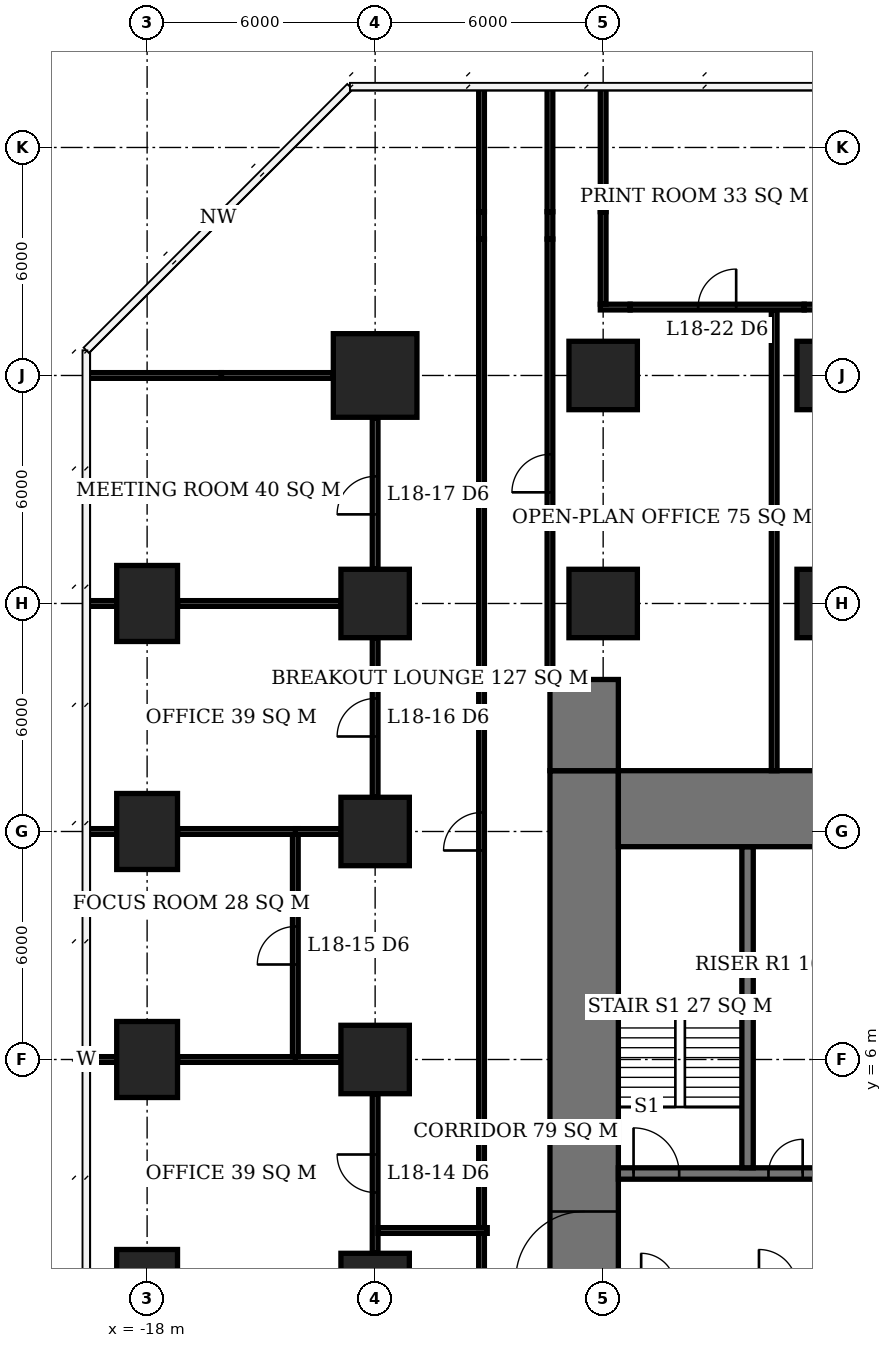
"""IFC4 building model, lengths in metres.
Left out: names, types, materials, properties, quantities, classifications, styles, units other than length and angle.
Written with IfcOpenShell. Run it as: python <this file> out.ifc"""

import sys

from ifc_helpers import new_model, si_unit, direction, frame, frame_2d, origin, origin_2d, place, context, subcontext, project, spatial, rectangle, extrude, element, fill, save


model = new_model("IFC4")
c1 = context("Model", 3, precision=1e-05, world=origin(), true_north=direction((0.0, 1.0)))
c2 = subcontext(c1, "Body", "Model", "MODEL_VIEW")
j1 = project(units=[si_unit("LENGTHUNIT", "METRE"), si_unit("PLANEANGLEUNIT", "RADIAN")], contexts=[c1])
p1 = place(None, origin())
s1 = spatial("IfcSite", under=j1, at=p1, CompositionType="ELEMENT")
p2 = place(p1, origin())
s2 = spatial("IfcBuilding", under=s1, at=p2, CompositionType="ELEMENT")
p3 = place(p2, frame((0.0, 0.0, 76.7)))
s3 = spatial("IfcBuildingStorey", under=s2, at=p3, CompositionType="ELEMENT", Elevation=76.7)
for number, where, z_axis, x_axis in (
    (1, (-18.0, 0.0, 0.0), (0.0, 0.0, 1.0), (0.0, 1.0, 0.0)),
    (2, (-18.0, 6.0, 0.0), (0.0, 0.0, 1.0), (0.0, 1.0, 0.0)),
    (3, (-18.0, 12.0, 0.0), (0.0, 0.0, 1.0), (0.0, 1.0, 0.0)),
    (4, (-18.0, 18.0, 0.0), (0.0, 0.0, 1.0), (0.0, 1.0, 0.0)),
):
    element("IfcColumn", number, at=place(p3, frame(where, z_axis=z_axis, x_axis=x_axis)), inside=s3, PredefinedType="COLUMN", context=c2, shape_type="SweptSolid", body=[
        extrude(rectangle(XDim=2.0, YDim=1.6, at=origin_2d()), origin(), (0.0, 0.0, 1.0), 3.9),
    ])
for number, where, z_axis, x_axis in (
    (5, (-12.0, 0.0, 0.0), (0.0, 0.0, 1.0), (1.0, 0.0, 0.0)),
    (6, (-12.0, 6.0, 0.0), (0.0, 0.0, 1.0), (1.0, 0.0, 0.0)),
    (7, (-12.0, 12.0, 0.0), (0.0, 0.0, 1.0), (1.0, 0.0, 0.0)),
    (8, (-12.0, 18.0, 0.0), (0.0, 0.0, 1.0), (1.0, 0.0, 0.0)),
):
    element("IfcColumn", number, at=place(p3, frame(where, z_axis=z_axis, x_axis=x_axis)), inside=s3, PredefinedType="COLUMN", context=c2, shape_type="SweptSolid", body=[
        extrude(rectangle(XDim=1.8, YDim=1.8, at=origin_2d()), origin(), (0.0, 0.0, 1.0), 3.9),
    ])
p4 = place(p3, frame((-12.0, 24.0, 0.0), z_axis=(0.0, 0.0, 1.0), x_axis=(1.0, 0.0, 0.0)))
e9 = element("IfcColumn", 9, at=p4, inside=s3, PredefinedType="COLUMN", context=c2, shape_type="SweptSolid", body=[
    extrude(rectangle(XDim=2.2, YDim=2.2, at=origin_2d()), origin(), (0.0, 0.0, 1.0), 3.9),
])
for number, where, z_axis, x_axis in (
    (10, (-6.0, 18.0, 0.0), (0.0, 0.0, 1.0), (1.0, 0.0, 0.0)),
    (11, (-6.0, 24.0, 0.0), (0.0, 0.0, 1.0), (1.0, 0.0, 0.0)),
    (12, (0.0, 18.0, 0.0), (0.0, 0.0, 1.0), (1.0, 0.0, 0.0)),
    (13, (0.0, 24.0, 0.0), (0.0, 0.0, 1.0), (1.0, 0.0, 0.0)),
):
    element("IfcColumn", number, at=place(p3, frame(where, z_axis=z_axis, x_axis=x_axis)), inside=s3, PredefinedType="COLUMN", context=c2, shape_type="SweptSolid", body=[
        extrude(rectangle(XDim=1.8, YDim=1.8, at=origin_2d()), origin(), (0.0, 0.0, 1.0), 3.9),
    ])
p5 = place(p3, frame((-5.6, 12.6, 0.0), z_axis=(0.0, 0.0, 1.0), x_axis=(1.0, 0.0, 0.0)))
e14 = element("IfcWall", 14, at=p5, inside=s3, PredefinedType="SHEAR", context=c2, shape_type="SweptSolid", body=[
    extrude(rectangle(XDim=23.2, YDim=2.0, at=frame_2d((11.6, 0.0))), origin(), (0.0, 0.0, 1.0), 3.9),
])
p6 = place(p3, frame((-6.5, -7.6, 0.0), z_axis=(0.0, 0.0, 1.0), x_axis=(0.0, 1.0, 0.0)))
e15 = element("IfcWall", 15, at=p6, inside=s3, PredefinedType="SHEAR", context=c2, shape_type="SweptSolid", body=[
    extrude(rectangle(XDim=21.2, YDim=1.8, at=frame_2d((10.6, 0.0))), origin(), (0.0, 0.0, 1.0), 3.9),
])
p7 = place(p6, frame((7.8, 0.0, 0.0)))
e16 = element("IfcOpeningElement", 16, at=p7, cuts=e15, PredefinedType="OPENING", context=c2, shape_type="SweptSolid", body=[
    extrude(rectangle(XDim=1.8, YDim=2.4, at=frame_2d((0.9, 1.2))), frame((0.0, 0.91, 0.0), z_axis=(0.0, -1.0, 0.0), x_axis=(1.0, 0.0, 0.0)), (0.0, 0.0, 1.0), 1.82),
])
p8 = place(p3, frame((-6.5, 13.6, 0.0), z_axis=(0.0, 0.0, 1.0), x_axis=(0.0, 1.0, 0.0)))
e17 = element("IfcWall", 17, at=p8, inside=s3, PredefinedType="SHEAR", context=c2, shape_type="SweptSolid", body=[
    extrude(rectangle(XDim=2.4, YDim=1.8, at=frame_2d((1.2, 0.0))), origin(), (0.0, 0.0, 1.0), 3.9),
])
p9 = place(p3, frame((-5.6, 3.0, 0.0), z_axis=(0.0, 0.0, 1.0), x_axis=(1.0, 0.0, 0.0)))
e18 = element("IfcWall", 18, at=p9, inside=s3, PredefinedType="SHEAR", context=c2, shape_type="SweptSolid", body=[
    extrude(rectangle(XDim=5.45, YDim=0.3, at=frame_2d((2.725, 0.0))), origin(), (0.0, 0.0, 1.0), 3.9),
])
p10 = place(p9, frame((0.4, 0.0, 0.0)))
e19 = element("IfcOpeningElement", 19, at=p10, cuts=e18, PredefinedType="OPENING", context=c2, shape_type="SweptSolid", body=[
    extrude(rectangle(XDim=1.2, YDim=2.1, at=frame_2d((0.6, 1.05))), frame((0.0, 0.16, 0.0), z_axis=(0.0, -1.0, 0.0), x_axis=(1.0, 0.0, 0.0)), (0.0, 0.0, 1.0), 0.32),
])
p11 = place(p9, frame((3.95, 0.0, 0.0)))
e20 = element("IfcOpeningElement", 20, at=p11, cuts=e18, PredefinedType="OPENING", context=c2, shape_type="SweptSolid", body=[
    extrude(rectangle(XDim=0.9, YDim=2.1, at=frame_2d((0.45, 1.05))), frame((0.0, 0.16, 0.0), z_axis=(0.0, -1.0, 0.0), x_axis=(1.0, 0.0, 0.0)), (0.0, 0.0, 1.0), 0.32),
])
p12 = place(p3, frame((-2.2, 3.15, 0.0), z_axis=(0.0, 0.0, 1.0), x_axis=(0.0, 1.0, 0.0)))
e21 = element("IfcWall", 21, at=p12, inside=s3, PredefinedType="SHEAR", context=c2, shape_type="SweptSolid", body=[
    extrude(rectangle(XDim=8.45, YDim=0.3, at=frame_2d((4.225, 0.0))), origin(), (0.0, 0.0, 1.0), 3.9),
])
p13 = place(p3, frame((-19.55, 6.0, 0.0), z_axis=(0.0, 0.0, 1.0), x_axis=(1.0, 0.0, 0.0)))
e22 = element("IfcWall", 22, at=p13, inside=s3, PredefinedType="PARTITIONING", context=c2, shape_type="SweptSolid", body=[
    extrude(rectangle(XDim=0.75, YDim=0.15, at=frame_2d((0.375, 0.0))), origin(), (0.0, 0.0, 1.0), 3.65),
])
p14 = place(p3, frame((-17.2, 6.0, 0.0), z_axis=(0.0, 0.0, 1.0), x_axis=(1.0, 0.0, 0.0)))
e23 = element("IfcWall", 23, at=p14, inside=s3, PredefinedType="PARTITIONING", context=c2, shape_type="SweptSolid", body=[
    extrude(rectangle(XDim=3.175, YDim=0.15, at=frame_2d((1.587, 0.0))), origin(), (0.0, 0.0, 1.0), 3.65),
])
p15 = place(p3, frame((-14.1, 6.0, 0.0), z_axis=(0.0, 0.0, 1.0), x_axis=(1.0, 0.0, 0.0)))
e24 = element("IfcWall", 24, at=p15, inside=s3, PredefinedType="PARTITIONING", context=c2, shape_type="SweptSolid", body=[
    extrude(rectangle(XDim=1.2, YDim=0.15, at=frame_2d((0.6, 0.0))), origin(), (0.0, 0.0, 1.0), 3.65),
])
p16 = place(p3, frame((-19.6, 12.0, 0.0), z_axis=(0.0, 0.0, 1.0), x_axis=(1.0, 0.0, 0.0)))
e25 = element("IfcWall", 25, at=p16, inside=s3, PredefinedType="PARTITIONING", context=c2, shape_type="SweptSolid", body=[
    extrude(rectangle(XDim=0.8, YDim=0.15, at=frame_2d((0.4, 0.0))), origin(), (0.0, 0.0, 1.0), 3.65),
])
p17 = place(p3, frame((-17.2, 12.0, 0.0), z_axis=(0.0, 0.0, 1.0), x_axis=(1.0, 0.0, 0.0)))
e26 = element("IfcWall", 26, at=p17, inside=s3, PredefinedType="PARTITIONING", context=c2, shape_type="SweptSolid", body=[
    extrude(rectangle(XDim=3.175, YDim=0.15, at=frame_2d((1.587, 0.0))), origin(), (0.0, 0.0, 1.0), 3.65),
])
p18 = place(p3, frame((-14.1, 12.0, 0.0), z_axis=(0.0, 0.0, 1.0), x_axis=(1.0, 0.0, 0.0)))
e27 = element("IfcWall", 27, at=p18, inside=s3, PredefinedType="PARTITIONING", context=c2, shape_type="SweptSolid", body=[
    extrude(rectangle(XDim=1.2, YDim=0.15, at=frame_2d((0.6, 0.0))), origin(), (0.0, 0.0, 1.0), 3.65),
])
p19 = place(p3, frame((-19.6, 18.0, 0.0), z_axis=(0.0, 0.0, 1.0), x_axis=(1.0, 0.0, 0.0)))
e28 = element("IfcWall", 28, at=p19, inside=s3, PredefinedType="PARTITIONING", context=c2, shape_type="SweptSolid", body=[
    extrude(rectangle(XDim=0.8, YDim=0.15, at=frame_2d((0.4, 0.0))), origin(), (0.0, 0.0, 1.0), 3.65),
])
p20 = place(p3, frame((-17.2, 18.0, 0.0), z_axis=(0.0, 0.0, 1.0), x_axis=(1.0, 0.0, 0.0)))
e29 = element("IfcWall", 29, at=p20, inside=s3, PredefinedType="PARTITIONING", context=c2, shape_type="SweptSolid", body=[
    extrude(rectangle(XDim=4.3, YDim=0.15, at=frame_2d((2.15, 0.0))), origin(), (0.0, 0.0, 1.0), 3.65),
])
p21 = place(p3, frame((-19.6, 24.0, 0.0), z_axis=(0.0, 0.0, 1.0), x_axis=(1.0, 0.0, 0.0)))
e30 = element("IfcWall", 30, at=p21, inside=s3, PredefinedType="PARTITIONING", context=c2, shape_type="SweptSolid", body=[
    extrude(rectangle(XDim=3.555, YDim=0.15, at=frame_2d((1.778, 0.0))), origin(), (0.0, 0.0, 1.0), 3.65),
])
p22 = place(p3, frame((-16.045, 24.0, 0.0), z_axis=(0.0, 0.0, 1.0), x_axis=(1.0, 0.0, 0.0)))
e31 = element("IfcWall", 31, at=p22, inside=s3, PredefinedType="PARTITIONING", context=c2, shape_type="SweptSolid", body=[
    extrude(rectangle(XDim=2.945, YDim=0.15, at=frame_2d((1.472, 0.0))), origin(), (0.0, 0.0, 1.0), 2.65),
])
p23 = place(p3, frame((-6.075, 25.8, 0.0), z_axis=(0.0, 0.0, 1.0), x_axis=(1.0, 0.0, 0.0)))
e32 = element("IfcWall", 32, at=p23, inside=s3, PredefinedType="PARTITIONING", context=c2, shape_type="SweptSolid", body=[
    extrude(rectangle(XDim=0.785, YDim=0.15, at=frame_2d((0.393, 0.0))), origin(), (0.0, 0.0, 1.0), 2.65),
])
p24 = place(p3, frame((-5.29, 25.8, 0.0), z_axis=(0.0, 0.0, 1.0), x_axis=(1.0, 0.0, 0.0)))
e33 = element("IfcWall", 33, at=p24, inside=s3, PredefinedType="PARTITIONING", context=c2, shape_type="SweptSolid", body=[
    extrude(rectangle(XDim=4.58, YDim=0.15, at=frame_2d((2.29, 0.0))), origin(), (0.0, 0.0, 1.0), 3.65),
])
p25 = place(p24, frame((1.79, 0.0, 0.0)))
e34 = element("IfcOpeningElement", 34, at=p25, cuts=e33, PredefinedType="OPENING", context=c2, shape_type="SweptSolid", body=[
    extrude(rectangle(XDim=1.0, YDim=2.1, at=frame_2d((0.5, 1.05))), frame((0.0, 0.085, 0.0), z_axis=(0.0, -1.0, 0.0), x_axis=(1.0, 0.0, 0.0)), (0.0, 0.0, 1.0), 0.17),
])
p26 = place(p3, frame((-0.71, 25.8, 0.0), z_axis=(0.0, 0.0, 1.0), x_axis=(1.0, 0.0, 0.0)))
e35 = element("IfcWall", 35, at=p26, inside=s3, PredefinedType="PARTITIONING", context=c2, shape_type="SweptSolid", body=[
    extrude(rectangle(XDim=0.785, YDim=0.15, at=frame_2d((0.393, 0.0))), origin(), (0.0, 0.0, 1.0), 2.65),
])
p27 = place(p3, frame((-14.1, 6.075, 0.0), z_axis=(0.0, 0.0, 1.0), x_axis=(0.0, 1.0, 0.0)))
e36 = element("IfcWall", 36, at=p27, inside=s3, PredefinedType="PARTITIONING", context=c2, shape_type="SweptSolid", body=[
    extrude(rectangle(XDim=5.85, YDim=0.15, at=frame_2d((2.925, 0.0))), origin(), (0.0, 0.0, 1.0), 3.65),
])
p28 = place(p27, frame((2.425, 0.0, 0.0)))
e37 = element("IfcOpeningElement", 37, at=p28, cuts=e36, PredefinedType="OPENING", context=c2, shape_type="SweptSolid", body=[
    extrude(rectangle(XDim=1.0, YDim=2.1, at=frame_2d((0.5, 1.05))), frame((0.0, 0.085, 0.0), z_axis=(0.0, -1.0, 0.0), x_axis=(1.0, 0.0, 0.0)), (0.0, 0.0, 1.0), 0.17),
])
p29 = place(p3, frame((-12.0, 0.9, 0.0), z_axis=(0.0, 0.0, 1.0), x_axis=(0.0, 1.0, 0.0)))
e38 = element("IfcWall", 38, at=p29, inside=s3, PredefinedType="PARTITIONING", context=c2, shape_type="SweptSolid", body=[
    extrude(rectangle(XDim=4.2, YDim=0.15, at=frame_2d((2.1, 0.0))), origin(), (0.0, 0.0, 1.0), 3.65),
])
p30 = place(p29, frame((1.6, 0.0, 0.0)))
e39 = element("IfcOpeningElement", 39, at=p30, cuts=e38, PredefinedType="OPENING", context=c2, shape_type="SweptSolid", body=[
    extrude(rectangle(XDim=1.0, YDim=2.1, at=frame_2d((0.5, 1.05))), frame((0.0, 0.085, 0.0), z_axis=(0.0, -1.0, 0.0), x_axis=(1.0, 0.0, 0.0)), (0.0, 0.0, 1.0), 0.17),
])
p31 = place(p3, frame((-12.0, 12.9, 0.0), z_axis=(0.0, 0.0, 1.0), x_axis=(0.0, 1.0, 0.0)))
e40 = element("IfcWall", 40, at=p31, inside=s3, PredefinedType="PARTITIONING", context=c2, shape_type="SweptSolid", body=[
    extrude(rectangle(XDim=4.2, YDim=0.15, at=frame_2d((2.1, 0.0))), origin(), (0.0, 0.0, 1.0), 3.65),
])
p32 = place(p31, frame((1.6, 0.0, 0.0)))
e41 = element("IfcOpeningElement", 41, at=p32, cuts=e40, PredefinedType="OPENING", context=c2, shape_type="SweptSolid", body=[
    extrude(rectangle(XDim=1.0, YDim=2.1, at=frame_2d((0.5, 1.05))), frame((0.0, 0.085, 0.0), z_axis=(0.0, -1.0, 0.0), x_axis=(1.0, 0.0, 0.0)), (0.0, 0.0, 1.0), 0.17),
])
p33 = place(p3, frame((-12.0, 18.9, 0.0), z_axis=(0.0, 0.0, 1.0), x_axis=(0.0, 1.0, 0.0)))
e42 = element("IfcWall", 42, at=p33, inside=s3, PredefinedType="PARTITIONING", context=c2, shape_type="SweptSolid", body=[
    extrude(rectangle(XDim=3.99, YDim=0.15, at=frame_2d((1.995, 0.0))), origin(), (0.0, 0.0, 1.0), 3.65),
])
p34 = place(p33, frame((1.445, 0.0, 0.0)))
e43 = element("IfcOpeningElement", 43, at=p34, cuts=e42, PredefinedType="OPENING", context=c2, shape_type="SweptSolid", body=[
    extrude(rectangle(XDim=1.0, YDim=2.1, at=frame_2d((0.5, 1.05))), frame((0.0, 0.085, 0.0), z_axis=(0.0, -1.0, 0.0), x_axis=(1.0, 0.0, 0.0)), (0.0, 0.0, 1.0), 0.17),
])
p35 = place(p3, frame((-6.0, 25.875, 0.0), z_axis=(0.0, 0.0, 1.0), x_axis=(0.0, 1.0, 0.0)))
e44 = element("IfcWall", 44, at=p35, inside=s3, PredefinedType="PARTITIONING", context=c2, shape_type="SweptSolid", body=[
    extrude(rectangle(XDim=2.435, YDim=0.15, at=frame_2d((1.218, 0.0))), origin(), (0.0, 0.0, 1.0), 2.65),
])
p36 = place(p3, frame((-6.0, 28.31, 0.0), z_axis=(0.0, 0.0, 1.0), x_axis=(0.0, 1.0, 0.0)))
e45 = element("IfcWall", 45, at=p36, inside=s3, PredefinedType="PARTITIONING", context=c2, shape_type="SweptSolid", body=[
    extrude(rectangle(XDim=3.29, YDim=0.15, at=frame_2d((1.645, 0.0))), origin(), (0.0, 0.0, 1.0), 3.65),
])
p37 = place(p3, frame((-11.925, 1.5, 0.0), z_axis=(0.0, 0.0, 1.0), x_axis=(1.0, 0.0, 0.0)))
e46 = element("IfcWall", 46, at=p37, inside=s3, PredefinedType="PARTITIONING", context=c2, shape_type="SweptSolid", body=[
    extrude(rectangle(XDim=2.875, YDim=0.15, at=frame_2d((1.438, 0.0))), origin(), (0.0, 0.0, 1.0), 3.65),
])
p38 = place(p3, frame((-9.2, -7.425, 0.0), z_axis=(0.0, 0.0, 1.0), x_axis=(0.0, 1.0, 0.0)))
e47 = element("IfcWall", 47, at=p38, inside=s3, PredefinedType="PARTITIONING", context=c2, shape_type="SweptSolid", body=[
    extrude(rectangle(XDim=8.85, YDim=0.15, at=frame_2d((4.425, 0.0))), origin(), (0.0, 0.0, 1.0), 3.65),
])
p39 = place(p38, frame((2.575, 0.0, 0.0)))
e48 = element("IfcOpeningElement", 48, at=p39, cuts=e47, PredefinedType="OPENING", context=c2, shape_type="SweptSolid", body=[
    extrude(rectangle(XDim=1.0, YDim=2.1, at=frame_2d((0.5, 1.05))), frame((0.0, 0.085, 0.0), z_axis=(0.0, -1.0, 0.0), x_axis=(1.0, 0.0, 0.0)), (0.0, 0.0, 1.0), 0.17),
])
p40 = place(p3, frame((-9.2, 1.575, 0.0), z_axis=(0.0, 0.0, 1.0), x_axis=(0.0, 1.0, 0.0)))
e49 = element("IfcWall", 49, at=p40, inside=s3, PredefinedType="PARTITIONING", context=c2, shape_type="SweptSolid", body=[
    extrude(rectangle(XDim=26.015, YDim=0.15, at=frame_2d((13.008, 0.0))), origin(), (0.0, 0.0, 1.0), 3.65),
])
p41 = place(p40, frame((9.925, 0.0, 0.0)))
e50 = element("IfcOpeningElement", 50, at=p41, cuts=e49, PredefinedType="OPENING", context=c2, shape_type="SweptSolid", body=[
    extrude(rectangle(XDim=1.0, YDim=2.1, at=frame_2d((0.5, 1.05))), frame((0.0, 0.085, 0.0), z_axis=(0.0, -1.0, 0.0), x_axis=(1.0, 0.0, 0.0)), (0.0, 0.0, 1.0), 0.17),
])
p42 = place(p3, frame((-9.2, 27.59, 0.0), z_axis=(0.0, 0.0, 1.0), x_axis=(0.0, 1.0, 0.0)))
e51 = element("IfcWall", 51, at=p42, inside=s3, PredefinedType="PARTITIONING", context=c2, shape_type="SweptSolid", body=[
    extrude(rectangle(XDim=0.72, YDim=0.15, at=frame_2d((0.36, 0.0))), origin(), (0.0, 0.0, 1.0), 2.65),
])
p43 = place(p3, frame((-9.2, 28.31, 0.0), z_axis=(0.0, 0.0, 1.0), x_axis=(0.0, 1.0, 0.0)))
e52 = element("IfcWall", 52, at=p43, inside=s3, PredefinedType="PARTITIONING", context=c2, shape_type="SweptSolid", body=[
    extrude(rectangle(XDim=3.29, YDim=0.15, at=frame_2d((1.645, 0.0))), origin(), (0.0, 0.0, 1.0), 3.65),
])
p44 = place(p3, frame((-7.4, 16.0, 0.0), z_axis=(0.0, 0.0, 1.0), x_axis=(0.0, 1.0, 0.0)))
e53 = element("IfcWall", 53, at=p44, inside=s3, PredefinedType="PARTITIONING", context=c2, shape_type="SweptSolid", body=[
    extrude(rectangle(XDim=11.59, YDim=0.15, at=frame_2d((5.795, 0.0))), origin(), (0.0, 0.0, 1.0), 3.65),
])
p45 = place(p44, frame((4.925, 0.0, 0.0)))
e54 = element("IfcOpeningElement", 54, at=p45, cuts=e53, PredefinedType="OPENING", context=c2, shape_type="SweptSolid", body=[
    extrude(rectangle(XDim=1.0, YDim=2.1, at=frame_2d((0.5, 1.05))), frame((0.0, 0.085, 0.0), z_axis=(0.0, -1.0, 0.0), x_axis=(1.0, 0.0, 0.0)), (0.0, 0.0, 1.0), 0.17),
])
p46 = place(p3, frame((-7.4, 27.59, 0.0), z_axis=(0.0, 0.0, 1.0), x_axis=(0.0, 1.0, 0.0)))
e55 = element("IfcWall", 55, at=p46, inside=s3, PredefinedType="PARTITIONING", context=c2, shape_type="SweptSolid", body=[
    extrude(rectangle(XDim=0.72, YDim=0.15, at=frame_2d((0.36, 0.0))), origin(), (0.0, 0.0, 1.0), 2.65),
])
p47 = place(p3, frame((-7.4, 28.31, 0.0), z_axis=(0.0, 0.0, 1.0), x_axis=(0.0, 1.0, 0.0)))
e56 = element("IfcWall", 56, at=p47, inside=s3, PredefinedType="PARTITIONING", context=c2, shape_type="SweptSolid", body=[
    extrude(rectangle(XDim=3.29, YDim=0.15, at=frame_2d((1.645, 0.0))), origin(), (0.0, 0.0, 1.0), 3.65),
])
p48 = place(p3, frame((-1.5, 13.6, 0.0), z_axis=(0.0, 0.0, 1.0), x_axis=(0.0, 1.0, 0.0)))
e57 = element("IfcWall", 57, at=p48, inside=s3, PredefinedType="PARTITIONING", context=c2, shape_type="SweptSolid", body=[
    extrude(rectangle(XDim=12.125, YDim=0.15, at=frame_2d((6.062, 0.0))), origin(), (0.0, 0.0, 1.0), 3.65),
])
p49 = place(p7, origin())
e58 = element("IfcDoor", 58, at=p49, inside=s3, OperationType="DOUBLE_DOOR_SINGLE_SWING", PredefinedType="DOOR", context=c2, shape_type="SweptSolid", body=[
    extrude(rectangle(XDim=1.8, YDim=2.4, at=frame_2d((0.9, 1.2))), frame((0.0, 0.025, 0.0), z_axis=(0.0, -1.0, 0.0), x_axis=(1.0, 0.0, 0.0)), (0.0, 0.0, 1.0), 0.05),
])
fill(e16, e58)
p50 = place(p10, origin())
e59 = element("IfcDoor", 59, at=p50, inside=s3, OperationType="SINGLE_SWING_LEFT", PredefinedType="DOOR", context=c2, shape_type="SweptSolid", body=[
    extrude(rectangle(XDim=1.2, YDim=2.1, at=frame_2d((0.6, 1.05))), frame((0.0, 0.025, 0.0), z_axis=(0.0, -1.0, 0.0), x_axis=(1.0, 0.0, 0.0)), (0.0, 0.0, 1.0), 0.05),
])
fill(e19, e59)
p51 = place(p11, origin())
e60 = element("IfcDoor", 60, at=p51, inside=s3, OperationType="SINGLE_SWING_RIGHT", PredefinedType="DOOR", context=c2, shape_type="SweptSolid", body=[
    extrude(rectangle(XDim=0.9, YDim=2.1, at=frame_2d((0.45, 1.05))), frame((0.0, 0.025, 0.0), z_axis=(0.0, -1.0, 0.0), x_axis=(1.0, 0.0, 0.0)), (0.0, 0.0, 1.0), 0.05),
])
fill(e20, e60)
p52 = place(p30, origin())
e61 = element("IfcDoor", 61, at=p52, inside=s3, OperationType="SINGLE_SWING_RIGHT", PredefinedType="DOOR", context=c2, shape_type="SweptSolid", body=[
    extrude(rectangle(XDim=1.0, YDim=2.1, at=frame_2d((0.5, 1.05))), frame((0.0, 0.025, 0.0), z_axis=(0.0, -1.0, 0.0), x_axis=(1.0, 0.0, 0.0)), (0.0, 0.0, 1.0), 0.05),
])
fill(e39, e61)
p53 = place(p28, origin())
e62 = element("IfcDoor", 62, at=p53, inside=s3, OperationType="SINGLE_SWING_LEFT", PredefinedType="DOOR", context=c2, shape_type="SweptSolid", body=[
    extrude(rectangle(XDim=1.0, YDim=2.1, at=frame_2d((0.5, 1.05))), frame((0.0, 0.025, 0.0), z_axis=(0.0, -1.0, 0.0), x_axis=(1.0, 0.0, 0.0)), (0.0, 0.0, 1.0), 0.05),
])
fill(e37, e62)
p54 = place(p32, origin())
e63 = element("IfcDoor", 63, at=p54, inside=s3, OperationType="SINGLE_SWING_LEFT", PredefinedType="DOOR", context=c2, shape_type="SweptSolid", body=[
    extrude(rectangle(XDim=1.0, YDim=2.1, at=frame_2d((0.5, 1.05))), frame((0.0, 0.025, 0.0), z_axis=(0.0, -1.0, 0.0), x_axis=(1.0, 0.0, 0.0)), (0.0, 0.0, 1.0), 0.05),
])
fill(e41, e63)
p55 = place(p34, origin())
e64 = element("IfcDoor", 64, at=p55, inside=s3, OperationType="SINGLE_SWING_LEFT", PredefinedType="DOOR", context=c2, shape_type="SweptSolid", body=[
    extrude(rectangle(XDim=1.0, YDim=2.1, at=frame_2d((0.5, 1.05))), frame((0.0, 0.025, 0.0), z_axis=(0.0, -1.0, 0.0), x_axis=(1.0, 0.0, 0.0)), (0.0, 0.0, 1.0), 0.05),
])
fill(e43, e64)
p56 = place(p25, origin())
e65 = element("IfcDoor", 65, at=p56, inside=s3, OperationType="SINGLE_SWING_RIGHT", PredefinedType="DOOR", context=c2, shape_type="SweptSolid", body=[
    extrude(rectangle(XDim=1.0, YDim=2.1, at=frame_2d((0.5, 1.05))), frame((0.0, 0.025, 0.0), z_axis=(0.0, -1.0, 0.0), x_axis=(1.0, 0.0, 0.0)), (0.0, 0.0, 1.0), 0.05),
])
fill(e34, e65)
p57 = place(p41, origin())
e66 = element("IfcDoor", 66, at=p57, inside=s3, OperationType="SINGLE_SWING_LEFT", PredefinedType="DOOR", context=c2, shape_type="SweptSolid", body=[
    extrude(rectangle(XDim=1.0, YDim=2.1, at=frame_2d((0.5, 1.05))), frame((0.0, 0.025, 0.0), z_axis=(0.0, -1.0, 0.0), x_axis=(1.0, 0.0, 0.0)), (0.0, 0.0, 1.0), 0.05),
])
fill(e50, e66)
p58 = place(p45, origin())
e67 = element("IfcDoor", 67, at=p58, inside=s3, OperationType="SINGLE_SWING_LEFT", PredefinedType="DOOR", context=c2, shape_type="SweptSolid", body=[
    extrude(rectangle(XDim=1.0, YDim=2.1, at=frame_2d((0.5, 1.05))), frame((0.0, 0.025, 0.0), z_axis=(0.0, -1.0, 0.0), x_axis=(1.0, 0.0, 0.0)), (0.0, 0.0, 1.0), 0.05),
])
fill(e54, e67)
save(model, sys.argv[1])
